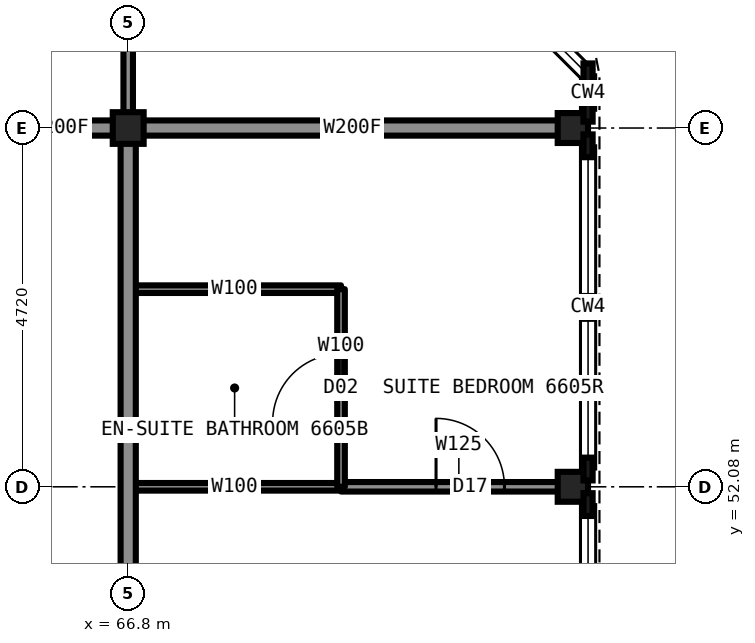
"""IFC4 building model, lengths in metres.
Left out: names, types, materials, properties, quantities, classifications, styles, units other than length and angle.
Written with IfcOpenShell. Run it as: python <this file> out.ifc"""

import sys

from ifc_helpers import new_model, si_unit, direction, frame, frame_2d, origin, origin_2d, place, context, subcontext, project, spatial, rectangle, i_section, extrude, element, fill, save


model = new_model("IFC4")
c1 = context("Model", 3, precision=1e-05, world=origin(), true_north=direction((0.0, 1.0)))
c2 = subcontext(c1, "Body", "Model", "MODEL_VIEW")
j1 = project(units=[si_unit("LENGTHUNIT", "METRE"), si_unit("PLANEANGLEUNIT", "RADIAN")], contexts=[c1])
p1 = place(None, origin())
s1 = spatial("IfcSite", under=j1, at=p1, CompositionType="ELEMENT")
p2 = place(p1, origin())
s2 = spatial("IfcBuilding", under=s1, at=p2, CompositionType="ELEMENT")
p3 = place(p2, frame((0.0, 0.0, 237.2)))
s3 = spatial("IfcBuildingStorey", under=s2, at=p3, CompositionType="ELEMENT", Elevation=237.2)
for number, where, z_axis, x_axis in (
    (1, (72.65, 52.08, 0.0), (0.0, 0.0, 1.0), (1.0, 0.0, 0.0)),
    (2, (72.65, 56.8, 0.0), (0.0, 0.0, 1.0), (1.0, 0.0, 0.0)),
):
    element("IfcColumn", number, at=place(p3, frame(where, z_axis=z_axis, x_axis=x_axis)), inside=s3, PredefinedType="COLUMN", context=c2, shape_type="SweptSolid", body=[
        extrude(i_section(OverallWidth=0.399, OverallDepth=0.394, WebThickness=0.023, FlangeThickness=0.037, at=origin_2d()), origin(), (0.0, 0.0, 1.0), 3.5),
    ])
p4 = place(p3, frame((66.8, 56.8, 0.0), z_axis=(0.0, 0.0, 1.0), x_axis=(1.0, 0.0, 0.0)))
e3 = element("IfcColumn", 3, at=p4, inside=s3, PredefinedType="COLUMN", context=c2, shape_type="SweptSolid", body=[
    extrude(i_section(OverallWidth=0.406, OverallDepth=0.417, WebThickness=0.03, FlangeThickness=0.048, at=origin_2d()), origin(), (0.0, 0.0, 1.0), 3.5),
])
p5 = place(p3, frame((65.0, 56.8, 0.0), z_axis=(0.0, 0.0, 1.0), x_axis=(1.0, 0.0, 0.0)))
e4 = element("IfcWall", 4, at=p5, inside=s3, PredefinedType="PARTITIONING", context=c2, shape_type="SweptSolid", body=[
    extrude(rectangle(XDim=1.8, YDim=0.2, at=frame_2d((0.9, 0.0))), origin(), (0.0, 0.0, 1.0), 3.33),
])
p6 = place(p3, frame((66.8, 56.8, 0.0), z_axis=(0.0, 0.0, 1.0), x_axis=(1.0, 0.0, 0.0)))
e5 = element("IfcWall", 5, at=p6, inside=s3, PredefinedType="PARTITIONING", context=c2, shape_type="SweptSolid", body=[
    extrude(rectangle(XDim=5.9, YDim=0.2, at=frame_2d((2.95, 0.0))), origin(), (0.0, 0.0, 1.0), 2.573),
])
p7 = place(p3, frame((66.8, 52.08, 0.0), z_axis=(0.0, 0.0, 1.0), x_axis=(1.0, 0.0, 0.0)))
e6 = element("IfcWall", 6, at=p7, inside=s3, PredefinedType="PARTITIONING", context=c2, shape_type="SweptSolid", body=[
    extrude(rectangle(XDim=2.8, YDim=0.1, at=frame_2d((1.4, 0.0))), origin(), (0.0, 0.0, 1.0), 2.573),
])
p8 = place(p3, frame((69.6, 52.08, 0.0), z_axis=(0.0, 0.0, 1.0), x_axis=(1.0, 0.0, 0.0)))
e7 = element("IfcWall", 7, at=p8, inside=s3, PredefinedType="PARTITIONING", context=c2, shape_type="SweptSolid", body=[
    extrude(rectangle(XDim=3.1, YDim=0.125, at=frame_2d((1.55, 0.0))), origin(), (0.0, 0.0, 1.0), 2.573),
])
p9 = place(p8, frame((1.25, 0.0, 0.0)))
e8 = element("IfcOpeningElement", 8, at=p9, cuts=e7, PredefinedType="OPENING", context=c2, shape_type="SweptSolid", body=[
    extrude(rectangle(XDim=0.9, YDim=2.2, at=frame_2d((0.45, 1.1))), frame((0.0, 0.073, 0.0), z_axis=(0.0, -1.0, 0.0), x_axis=(1.0, 0.0, 0.0)), (0.0, 0.0, 1.0), 0.145),
])
p10 = place(p3, frame((66.8, 54.68, 0.0), z_axis=(0.0, 0.0, 1.0), x_axis=(1.0, 0.0, 0.0)))
e9 = element("IfcWall", 9, at=p10, inside=s3, PredefinedType="PARTITIONING", context=c2, shape_type="SweptSolid", body=[
    extrude(rectangle(XDim=2.8, YDim=0.1, at=frame_2d((1.4, 0.0))), origin(), (0.0, 0.0, 1.0), 3.33),
])
p11 = place(p3, frame((66.8, 33.2, 0.0), z_axis=(0.0, 0.0, 1.0), x_axis=(0.0, 1.0, 0.0)))
e10 = element("IfcWall", 10, at=p11, inside=s3, PredefinedType="PARTITIONING", context=c2, shape_type="SweptSolid", body=[
    extrude(rectangle(XDim=23.6, YDim=0.2, at=frame_2d((11.8, 0.0))), origin(), (0.0, 0.0, 1.0), 3.33),
])
p12 = place(p11, frame((8.85, 0.0, 0.0)))
e11 = element("IfcOpeningElement", 11, at=p12, cuts=e10, PredefinedType="OPENING", context=c2, shape_type="SweptSolid", body=[
    extrude(rectangle(XDim=1.1, YDim=2.2, at=frame_2d((0.55, 1.1))), frame((0.0, 0.11, 0.0), z_axis=(0.0, -1.0, 0.0), x_axis=(1.0, 0.0, 0.0)), (0.0, 0.0, 1.0), 0.22),
])
p13 = place(p11, frame((13.65, 0.0, 0.0)))
e12 = element("IfcOpeningElement", 12, at=p13, cuts=e10, PredefinedType="OPENING", context=c2, shape_type="SweptSolid", body=[
    extrude(rectangle(XDim=1.1, YDim=2.2, at=frame_2d((0.55, 1.1))), frame((0.0, 0.11, 0.0), z_axis=(0.0, -1.0, 0.0), x_axis=(1.0, 0.0, 0.0)), (0.0, 0.0, 1.0), 0.22),
])
p14 = place(p3, frame((66.8, 56.8, 0.0), z_axis=(0.0, 0.0, 1.0), x_axis=(0.0, 1.0, 0.0)))
e13 = element("IfcWall", 13, at=p14, inside=s3, PredefinedType="PARTITIONING", context=c2, shape_type="SweptSolid", body=[
    extrude(rectangle(XDim=5.9, YDim=0.125, at=frame_2d((2.95, 0.0))), origin(), (0.0, 0.0, 1.0), 2.573),
])
p15 = place(p14, frame((3.55, 0.0, 0.0)))
e14 = element("IfcOpeningElement", 14, at=p15, cuts=e13, PredefinedType="OPENING", context=c2, shape_type="SweptSolid", body=[
    extrude(rectangle(XDim=0.9, YDim=2.2, at=frame_2d((0.45, 1.1))), frame((0.0, 0.073, 0.0), z_axis=(0.0, -1.0, 0.0), x_axis=(1.0, 0.0, 0.0)), (0.0, 0.0, 1.0), 0.145),
])
p16 = place(p3, frame((69.6, 52.08, 0.0), z_axis=(0.0, 0.0, 1.0), x_axis=(0.0, 1.0, 0.0)))
e15 = element("IfcWall", 15, at=p16, inside=s3, PredefinedType="PARTITIONING", context=c2, shape_type="SweptSolid", body=[
    extrude(rectangle(XDim=2.6, YDim=0.1, at=frame_2d((1.3, 0.0))), origin(), (0.0, 0.0, 1.0), 3.33),
])
p17 = place(p16, frame((0.85, 0.0, 0.0)))
e16 = element("IfcOpeningElement", 16, at=p17, cuts=e15, PredefinedType="OPENING", context=c2, shape_type="SweptSolid", body=[
    extrude(rectangle(XDim=0.9, YDim=2.1, at=frame_2d((0.45, 1.05))), frame((0.0, 0.06, 0.0), z_axis=(0.0, -1.0, 0.0), x_axis=(1.0, 0.0, 0.0)), (0.0, 0.0, 1.0), 0.12),
])
p18 = place(p17, origin())
e17 = element("IfcDoor", 17, at=p18, inside=s3, OperationType="SINGLE_SWING_RIGHT", PredefinedType="DOOR", context=c2, shape_type="SweptSolid", body=[
    extrude(rectangle(XDim=0.9, YDim=2.1, at=frame_2d((0.45, 1.05))), frame((0.0, 0.025, 0.0), z_axis=(0.0, -1.0, 0.0), x_axis=(1.0, 0.0, 0.0)), (0.0, 0.0, 1.0), 0.05),
])
fill(e16, e17)
p19 = place(p9, origin())
e18 = element("IfcDoor", 18, at=p19, inside=s3, OperationType="SINGLE_SWING_LEFT", PredefinedType="DOOR", context=c2, shape_type="SweptSolid", body=[
    extrude(rectangle(XDim=0.9, YDim=2.2, at=frame_2d((0.45, 1.1))), frame((0.0, 0.025, 0.0), z_axis=(0.0, -1.0, 0.0), x_axis=(1.0, 0.0, 0.0)), (0.0, 0.0, 1.0), 0.05),
])
fill(e8, e18)
save(model, sys.argv[1])
